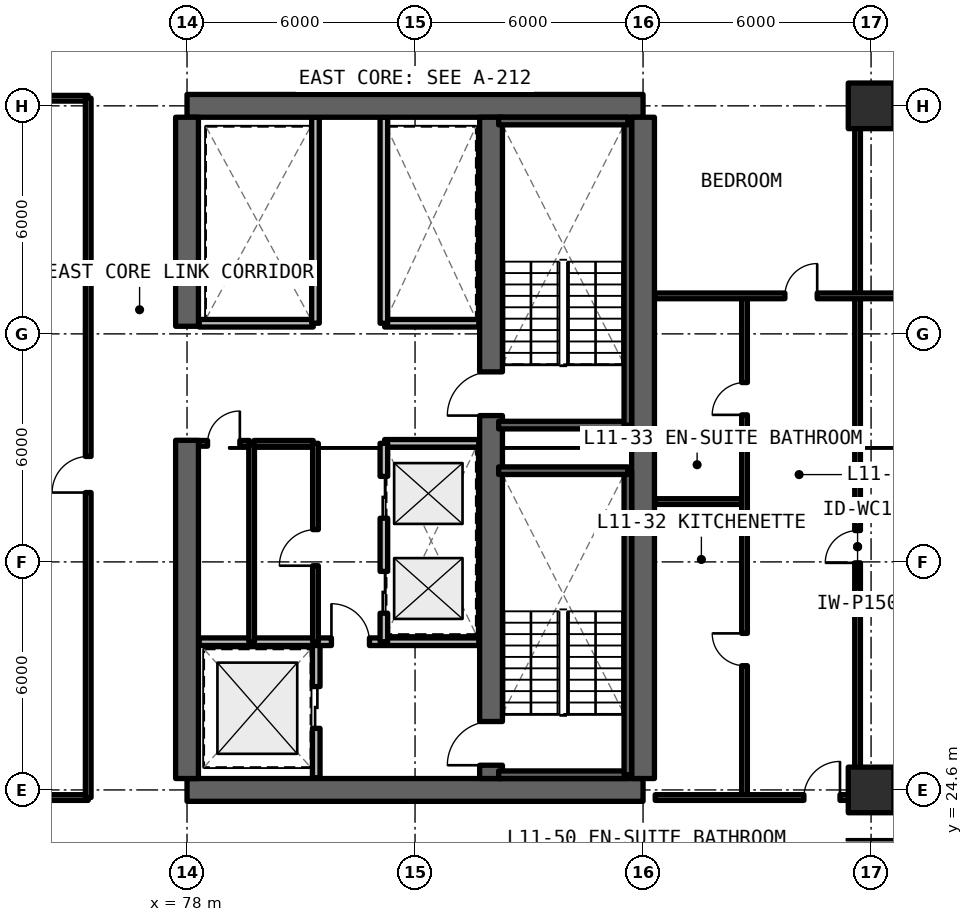
"""IFC4 building model, lengths in metres.
Left out: names, types, materials, properties, quantities, classifications, styles, units other than length and angle.
Written with IfcOpenShell. Run it as: python <this file> out.ifc"""

import sys

from ifc_helpers import new_model, si_unit, direction, frame, frame_2d, origin, origin_2d, place, context, subcontext, project, spatial, rectangle, extrude, element, fill, save


model = new_model("IFC4")
c1 = context("Model", 3, precision=1e-05, world=origin(), true_north=direction((0.0, 1.0)))
c2 = subcontext(c1, "Body", "Model", "MODEL_VIEW")
j1 = project(units=[si_unit("LENGTHUNIT", "METRE"), si_unit("PLANEANGLEUNIT", "RADIAN")], contexts=[c1])
p1 = place(None, origin())
s1 = spatial("IfcSite", under=j1, at=p1, CompositionType="ELEMENT")
p2 = place(p1, origin())
s2 = spatial("IfcBuilding", under=s1, at=p2, CompositionType="ELEMENT")
p3 = place(p2, frame((0.0, 0.0, 42.24)))
s3 = spatial("IfcBuildingStorey", under=s2, at=p3, CompositionType="ELEMENT", Elevation=42.24)
for number, where, z_axis, x_axis in (
    (1, (78.0, 24.6, 0.0), (0.0, 0.0, 1.0), (1.0, 0.0, 0.0)),
    (2, (90.0, 42.6, 0.0), (0.0, 0.0, 1.0), (-1.0, 0.0, 0.0)),
):
    element("IfcWall", number, at=place(p3, frame(where, z_axis=z_axis, x_axis=x_axis)), inside=s3, PredefinedType="SHEAR", context=c2, shape_type="SweptSolid", body=[
        extrude(rectangle(XDim=12.0, YDim=0.6, at=frame_2d((6.0, 0.0))), origin(), (0.0, 0.0, 1.0), 3.3),
    ])
p4 = place(p3, frame((90.0, 24.9, 0.0), z_axis=(0.0, 0.0, 1.0), x_axis=(0.0, 1.0, 0.0)))
e3 = element("IfcWall", 3, at=p4, inside=s3, PredefinedType="SHEAR", context=c2, shape_type="SweptSolid", body=[
    extrude(rectangle(XDim=17.4, YDim=0.6, at=frame_2d((8.7, 0.0))), origin(), (0.0, 0.0, 1.0), 3.3),
])
p5 = place(p3, frame((78.0, 24.9, 0.0), z_axis=(0.0, 0.0, 1.0), x_axis=(0.0, 1.0, 0.0)))
e4 = element("IfcWall", 4, at=p5, inside=s3, PredefinedType="SHEAR", context=c2, shape_type="SweptSolid", body=[
    extrude(rectangle(XDim=8.9, YDim=0.6, at=frame_2d((4.45, 0.0))), origin(), (0.0, 0.0, 1.0), 3.3),
])
p6 = place(p3, frame((78.0, 36.8, 0.0), z_axis=(0.0, 0.0, 1.0), x_axis=(0.0, 1.0, 0.0)))
e5 = element("IfcWall", 5, at=p6, inside=s3, PredefinedType="SHEAR", context=c2, shape_type="SweptSolid", body=[
    extrude(rectangle(XDim=5.5, YDim=0.6, at=frame_2d((2.75, 0.0))), origin(), (0.0, 0.0, 1.0), 3.3),
])
p7 = place(p3, frame((86.0, 24.9, 0.0), z_axis=(0.0, 0.0, 1.0), x_axis=(0.0, 1.0, 0.0)))
e6 = element("IfcWall", 6, at=p7, inside=s3, PredefinedType="SHEAR", context=c2, shape_type="SweptSolid", body=[
    extrude(rectangle(XDim=17.4, YDim=0.6, at=frame_2d((8.7, 0.0))), origin(), (0.0, 0.0, 1.0), 3.3),
])
p8 = place(p7, frame((0.35, 0.0, 0.0)))
e7 = element("IfcOpeningElement", 7, at=p8, cuts=e6, PredefinedType="OPENING", context=c2, shape_type="SweptSolid", body=[
    extrude(rectangle(XDim=1.15, YDim=2.15, at=frame_2d((0.575, 1.075))), frame((0.0, 0.31, 0.0), z_axis=(0.0, -1.0, 0.0), x_axis=(1.0, 0.0, 0.0)), (0.0, 0.0, 1.0), 0.62),
])
p9 = place(p7, frame((9.55, 0.0, 0.0)))
e8 = element("IfcOpeningElement", 8, at=p9, cuts=e6, PredefinedType="OPENING", context=c2, shape_type="SweptSolid", body=[
    extrude(rectangle(XDim=1.15, YDim=2.15, at=frame_2d((0.575, 1.075))), frame((0.0, 0.31, 0.0), z_axis=(0.0, -1.0, 0.0), x_axis=(1.0, 0.0, 0.0)), (0.0, 0.0, 1.0), 0.62),
])
for number, where, z_axis, x_axis in (
    (9, (96.0, 24.6, 0.0), (0.0, 0.0, 1.0), (1.0, 0.0, 0.0)),
    (10, (96.0, 42.6, 0.0), (0.0, 0.0, 1.0), (1.0, 0.0, 0.0)),
):
    element("IfcColumn", number, at=place(p3, frame(where, z_axis=z_axis, x_axis=x_axis)), inside=s3, PredefinedType="COLUMN", context=c2, shape_type="SweptSolid", body=[
        extrude(rectangle(XDim=1.2, YDim=1.2, at=origin_2d()), origin(), (0.0, 0.0, 1.0), 3.3),
    ])
p10 = place(p3, frame((81.4, 24.92, 0.0), z_axis=(0.0, 0.0, 1.0), x_axis=(0.0, 1.0, 0.0)))
e11 = element("IfcWall", 11, at=p10, inside=s3, PredefinedType="SOLIDWALL", context=c2, shape_type="SweptSolid", body=[
    extrude(rectangle(XDim=3.58, YDim=0.2, at=frame_2d((1.79, 0.0))), origin(), (0.0, 0.0, 1.0), 2.35),
])
p11 = place(p10, frame((1.3, 0.0, 0.0)))
e12 = element("IfcOpeningElement", 12, at=p11, cuts=e11, PredefinedType="OPENING", context=c2, shape_type="SweptSolid", body=[
    extrude(rectangle(XDim=1.1, YDim=2.2, at=frame_2d((0.55, 1.1))), frame((0.0, 0.11, 0.0), z_axis=(0.0, -1.0, 0.0), x_axis=(1.0, 0.0, 0.0)), (0.0, 0.0, 1.0), 0.22),
])
p12 = place(p3, frame((78.32, 28.5, 0.0), z_axis=(0.0, 0.0, 1.0), x_axis=(1.0, 0.0, 0.0)))
e13 = element("IfcWall", 13, at=p12, inside=s3, PredefinedType="SOLIDWALL", context=c2, shape_type="SweptSolid", body=[
    extrude(rectangle(XDim=7.36, YDim=0.2, at=frame_2d((3.68, 0.0))), origin(), (0.0, 0.0, 1.0), 2.35),
])
p13 = place(p12, frame((3.48, 0.0, 0.0)))
e14 = element("IfcOpeningElement", 14, at=p13, cuts=e13, PredefinedType="OPENING", context=c2, shape_type="SweptSolid", body=[
    extrude(rectangle(XDim=1.0, YDim=2.15, at=frame_2d((0.5, 1.075))), frame((0.0, 0.11, 0.0), z_axis=(0.0, -1.0, 0.0), x_axis=(1.0, 0.0, 0.0)), (0.0, 0.0, 1.0), 0.22),
])
p14 = place(p3, frame((83.2, 33.72, 0.0), z_axis=(0.0, 0.0, 1.0), x_axis=(1.0, 0.0, 0.0)))
e15 = element("IfcWall", 15, at=p14, inside=s3, PredefinedType="SOLIDWALL", context=c2, shape_type="SweptSolid", body=[
    extrude(rectangle(XDim=2.48, YDim=0.2, at=frame_2d((1.24, 0.0))), origin(), (0.0, 0.0, 1.0), 2.35),
])
p15 = place(p3, frame((83.18, 28.5, 0.0), z_axis=(0.0, 0.0, 1.0), x_axis=(0.0, 1.0, 0.0)))
e16 = element("IfcWall", 16, at=p15, inside=s3, PredefinedType="SOLIDWALL", context=c2, shape_type="SweptSolid", body=[
    extrude(rectangle(XDim=5.22, YDim=0.2, at=frame_2d((2.61, 0.0))), origin(), (0.0, 0.0, 1.0), 2.35),
])
p16 = place(p15, frame((0.75, 0.0, 0.0)))
e17 = element("IfcOpeningElement", 17, at=p16, cuts=e16, PredefinedType="OPENING", context=c2, shape_type="SweptSolid", body=[
    extrude(rectangle(XDim=1.1, YDim=2.2, at=frame_2d((0.55, 1.1))), frame((0.0, 0.11, 0.0), z_axis=(0.0, -1.0, 0.0), x_axis=(1.0, 0.0, 0.0)), (0.0, 0.0, 1.0), 0.22),
])
p17 = place(p15, frame((3.25, 0.0, 0.0)))
e18 = element("IfcOpeningElement", 18, at=p17, cuts=e16, PredefinedType="OPENING", context=c2, shape_type="SweptSolid", body=[
    extrude(rectangle(XDim=1.1, YDim=2.2, at=frame_2d((0.55, 1.1))), frame((0.0, 0.11, 0.0), z_axis=(0.0, -1.0, 0.0), x_axis=(1.0, 0.0, 0.0)), (0.0, 0.0, 1.0), 0.22),
])
p18 = place(p3, frame((79.7, 28.5, 0.0), z_axis=(0.0, 0.0, 1.0), x_axis=(0.0, 1.0, 0.0)))
e19 = element("IfcWall", 19, at=p18, inside=s3, PredefinedType="SOLIDWALL", context=c2, shape_type="SweptSolid", body=[
    extrude(rectangle(XDim=5.22, YDim=0.15, at=frame_2d((2.61, 0.0))), origin(), (0.0, 0.0, 1.0), 2.35),
])
p19 = place(p3, frame((79.76, 33.72, 0.0), z_axis=(0.0, 0.0, 1.0), x_axis=(1.0, 0.0, 0.0)))
e20 = element("IfcWall", 20, at=p19, inside=s3, PredefinedType="SOLIDWALL", context=c2, shape_type="SweptSolid", body=[
    extrude(rectangle(XDim=1.56, YDim=0.15, at=frame_2d((0.78, 0.0))), origin(), (0.0, 0.0, 1.0), 2.35),
])
p20 = place(p3, frame((78.32, 33.72, 0.0), z_axis=(0.0, 0.0, 1.0), x_axis=(1.0, 0.0, 0.0)))
e21 = element("IfcWall", 21, at=p20, inside=s3, PredefinedType="SOLIDWALL", context=c2, shape_type="SweptSolid", body=[
    extrude(rectangle(XDim=1.32, YDim=0.15, at=frame_2d((0.66, 0.0))), origin(), (0.0, 0.0, 1.0), 2.35),
])
p21 = place(p20, frame((0.22, 0.0, 0.0)))
e22 = element("IfcOpeningElement", 22, at=p21, cuts=e21, PredefinedType="OPENING", context=c2, shape_type="SweptSolid", body=[
    extrude(rectangle(XDim=0.85, YDim=2.1, at=frame_2d((0.425, 1.05))), frame((0.0, 0.085, 0.0), z_axis=(0.0, -1.0, 0.0), x_axis=(1.0, 0.0, 0.0)), (0.0, 0.0, 1.0), 0.17),
])
p22 = place(p3, frame((81.38, 28.5, 0.0), z_axis=(0.0, 0.0, 1.0), x_axis=(0.0, 1.0, 0.0)))
e23 = element("IfcWall", 23, at=p22, inside=s3, PredefinedType="SOLIDWALL", context=c2, shape_type="SweptSolid", body=[
    extrude(rectangle(XDim=5.22, YDim=0.15, at=frame_2d((2.61, 0.0))), origin(), (0.0, 0.0, 1.0), 2.35),
])
p23 = place(p22, frame((2.0, 0.0, 0.0)))
e24 = element("IfcOpeningElement", 24, at=p23, cuts=e23, PredefinedType="OPENING", context=c2, shape_type="SweptSolid", body=[
    extrude(rectangle(XDim=0.95, YDim=2.15, at=frame_2d((0.475, 1.075))), frame((0.0, 0.085, 0.0), z_axis=(0.0, -1.0, 0.0), x_axis=(1.0, 0.0, 0.0)), (0.0, 0.0, 1.0), 0.17),
])
p24 = place(p3, frame((83.2, 36.88, 0.0), z_axis=(0.0, 0.0, 1.0), x_axis=(1.0, 0.0, 0.0)))
e25 = element("IfcWall", 25, at=p24, inside=s3, PredefinedType="SOLIDWALL", context=c2, shape_type="SweptSolid", body=[
    extrude(rectangle(XDim=2.48, YDim=0.2, at=frame_2d((1.24, 0.0))), origin(), (0.0, 0.0, 1.0), 2.35),
])
p25 = place(p3, frame((83.18, 36.88, 0.0), z_axis=(0.0, 0.0, 1.0), x_axis=(0.0, 1.0, 0.0)))
e26 = element("IfcWall", 26, at=p25, inside=s3, PredefinedType="SOLIDWALL", context=c2, shape_type="SweptSolid", body=[
    extrude(rectangle(XDim=5.42, YDim=0.2, at=frame_2d((2.71, 0.0))), origin(), (0.0, 0.0, 1.0), 2.35),
])
p26 = place(p3, frame((78.32, 36.88, 0.0), z_axis=(0.0, 0.0, 1.0), x_axis=(1.0, 0.0, 0.0)))
e27 = element("IfcWall", 27, at=p26, inside=s3, PredefinedType="SOLIDWALL", context=c2, shape_type="SweptSolid", body=[
    extrude(rectangle(XDim=3.0, YDim=0.2, at=frame_2d((1.5, 0.0))), origin(), (0.0, 0.0, 1.0), 2.35),
])
p27 = place(p3, frame((81.38, 36.88, 0.0), z_axis=(0.0, 0.0, 1.0), x_axis=(0.0, 1.0, 0.0)))
e28 = element("IfcWall", 28, at=p27, inside=s3, PredefinedType="SOLIDWALL", context=c2, shape_type="SweptSolid", body=[
    extrude(rectangle(XDim=5.42, YDim=0.2, at=frame_2d((2.71, 0.0))), origin(), (0.0, 0.0, 1.0), 2.35),
])
for number, where, z_axis, x_axis in (
    (29, (67.15, 24.4, 0.0), (0.0, 0.0, 1.0), (1.0, 0.0, 0.0)),
    (30, (67.15, 42.8, 0.0), (0.0, 0.0, 1.0), (1.0, 0.0, 0.0)),
):
    element("IfcWall", number, at=place(p3, frame(where, z_axis=z_axis, x_axis=x_axis)), inside=s3, PredefinedType="SOLIDWALL", context=c2, shape_type="SweptSolid", body=[
        extrude(rectangle(XDim=8.25, YDim=0.15, at=frame_2d((4.125, 0.0))), origin(), (0.0, 0.0, 1.0), 2.295),
    ])
p28 = place(p3, frame((75.4, 24.4, 0.0), z_axis=(0.0, 0.0, 1.0), x_axis=(0.0, 1.0, 0.0)))
e31 = element("IfcWall", 31, at=p28, inside=s3, PredefinedType="SOLIDWALL", context=c2, shape_type="SweptSolid", body=[
    extrude(rectangle(XDim=18.4, YDim=0.15, at=frame_2d((9.2, 0.0))), origin(), (0.0, 0.0, 1.0), 2.35),
])
p29 = place(p28, frame((8.025, 0.0, 0.0)))
e32 = element("IfcOpeningElement", 32, at=p29, cuts=e31, PredefinedType="OPENING", context=c2, shape_type="SweptSolid", body=[
    extrude(rectangle(XDim=0.95, YDim=2.15, at=frame_2d((0.475, 1.075))), frame((0.0, 0.085, 0.0), z_axis=(0.0, -1.0, 0.0), x_axis=(1.0, 0.0, 0.0)), (0.0, 0.0, 1.0), 0.17),
])
p30 = place(p3, frame((95.645, 24.4, 0.0), z_axis=(0.0, 0.0, 1.0), x_axis=(0.0, 1.0, 0.0)))
e33 = element("IfcWall", 33, at=p30, inside=s3, PredefinedType="PARTITIONING", context=c2, shape_type="SweptSolid", body=[
    extrude(rectangle(XDim=13.2, YDim=0.15, at=frame_2d((6.6, 0.0))), origin(), (0.0, 0.0, 1.0), 2.35),
])
p31 = place(p30, frame((6.175, 0.0, 0.0)))
e34 = element("IfcOpeningElement", 34, at=p31, cuts=e33, PredefinedType="OPENING", context=c2, shape_type="SweptSolid", body=[
    extrude(rectangle(XDim=0.85, YDim=2.1, at=frame_2d((0.425, 1.05))), frame((0.0, 0.085, 0.0), z_axis=(0.0, -1.0, 0.0), x_axis=(1.0, 0.0, 0.0)), (0.0, 0.0, 1.0), 0.17),
])
p32 = place(p3, frame((90.32, 32.188, 0.0), z_axis=(0.0, 0.0, 1.0), x_axis=(1.0, 0.0, 0.0)))
e35 = element("IfcWall", 35, at=p32, inside=s3, PredefinedType="PARTITIONING", context=c2, shape_type="SweptSolid", body=[
    extrude(rectangle(XDim=2.35, YDim=0.15, at=frame_2d((1.175, 0.0))), origin(), (0.0, 0.0, 1.0), 2.35),
])
p33 = place(p3, frame((92.67, 24.4, 0.0), z_axis=(0.0, 0.0, 1.0), x_axis=(0.0, 1.0, 0.0)))
e36 = element("IfcWall", 36, at=p33, inside=s3, PredefinedType="PARTITIONING", context=c2, shape_type="SweptSolid", body=[
    extrude(rectangle(XDim=13.2, YDim=0.15, at=frame_2d((6.6, 0.0))), origin(), (0.0, 0.0, 1.0), 2.35),
])
p34 = place(p33, frame((3.469, 0.0, 0.0)))
e37 = element("IfcOpeningElement", 37, at=p34, cuts=e36, PredefinedType="OPENING", context=c2, shape_type="SweptSolid", body=[
    extrude(rectangle(XDim=0.85, YDim=2.1, at=frame_2d((0.425, 1.05))), frame((0.0, 0.085, 0.0), z_axis=(0.0, -1.0, 0.0), x_axis=(1.0, 0.0, 0.0)), (0.0, 0.0, 1.0), 0.17),
])
p35 = place(p33, frame((10.069, 0.0, 0.0)))
e38 = element("IfcOpeningElement", 38, at=p35, cuts=e36, PredefinedType="OPENING", context=c2, shape_type="SweptSolid", body=[
    extrude(rectangle(XDim=0.85, YDim=2.1, at=frame_2d((0.425, 1.05))), frame((0.0, 0.085, 0.0), z_axis=(0.0, -1.0, 0.0), x_axis=(1.0, 0.0, 0.0)), (0.0, 0.0, 1.0), 0.17),
])
p36 = place(p3, frame((95.645, 37.6, 0.0), z_axis=(0.0, 0.0, 1.0), x_axis=(0.0, 1.0, 0.0)))
e39 = element("IfcWall", 39, at=p36, inside=s3, PredefinedType="PARTITIONING", context=c2, shape_type="SweptSolid", body=[
    extrude(rectangle(XDim=5.2, YDim=0.15, at=frame_2d((2.6, 0.0))), origin(), (0.0, 0.0, 1.0), 2.35),
])
p37 = place(p3, frame((90.32, 37.6, 0.0), z_axis=(0.0, 0.0, 1.0), x_axis=(1.0, 0.0, 0.0)))
e40 = element("IfcWall", 40, at=p37, inside=s3, PredefinedType="PARTITIONING", context=c2, shape_type="SweptSolid", body=[
    extrude(rectangle(XDim=10.24, YDim=0.15, at=frame_2d((5.12, 0.0))), origin(), (0.0, 0.0, 1.0), 2.35),
])
p38 = place(p37, frame((3.412, 0.0, 0.0)))
e41 = element("IfcOpeningElement", 41, at=p38, cuts=e40, PredefinedType="OPENING", context=c2, shape_type="SweptSolid", body=[
    extrude(rectangle(XDim=0.85, YDim=2.1, at=frame_2d((0.425, 1.05))), frame((0.0, 0.085, 0.0), z_axis=(0.0, -1.0, 0.0), x_axis=(1.0, 0.0, 0.0)), (0.0, 0.0, 1.0), 0.17),
])
p39 = place(p37, frame((7.357, 0.0, 0.0)))
e42 = element("IfcOpeningElement", 42, at=p39, cuts=e40, PredefinedType="OPENING", context=c2, shape_type="SweptSolid", body=[
    extrude(rectangle(XDim=0.85, YDim=2.1, at=frame_2d((0.425, 1.05))), frame((0.0, 0.085, 0.0), z_axis=(0.0, -1.0, 0.0), x_axis=(1.0, 0.0, 0.0)), (0.0, 0.0, 1.0), 0.17),
])
p40 = place(p3, frame((90.32, 24.4, 0.0), z_axis=(0.0, 0.0, 1.0), x_axis=(1.0, 0.0, 0.0)))
e43 = element("IfcWall", 43, at=p40, inside=s3, PredefinedType="SOLIDWALL", context=c2, shape_type="SweptSolid", body=[
    extrude(rectangle(XDim=10.24, YDim=0.15, at=frame_2d((5.12, 0.0))), origin(), (0.0, 0.0, 1.0), 2.295),
])
p41 = place(p40, frame((3.913, 0.0, 0.0)))
e44 = element("IfcOpeningElement", 44, at=p41, cuts=e43, PredefinedType="OPENING", context=c2, shape_type="SweptSolid", body=[
    extrude(rectangle(XDim=0.95, YDim=2.15, at=frame_2d((0.475, 1.075))), frame((0.0, 0.085, 0.0), z_axis=(0.0, -1.0, 0.0), x_axis=(1.0, 0.0, 0.0)), (0.0, 0.0, 1.0), 0.17),
])
p42 = place(p3, frame((86.2, 25.0, 0.0), z_axis=(0.0, 0.0, 1.0), x_axis=(1.0, 0.0, 0.0)))
e45 = element("IfcWall", 45, at=p42, inside=s3, PredefinedType="SOLIDWALL", context=c2, shape_type="SweptSolid", body=[
    extrude(rectangle(XDim=3.4, YDim=0.2, at=frame_2d((1.7, 0.0))), origin(), (0.0, 0.0, 1.0), 3.3),
])
p43 = place(p3, frame((89.6, 25.0, 0.0), z_axis=(0.0, 0.0, 1.0), x_axis=(0.0, 1.0, 0.0)))
e46 = element("IfcWall", 46, at=p43, inside=s3, PredefinedType="SOLIDWALL", context=c2, shape_type="SweptSolid", body=[
    extrude(rectangle(XDim=8.0, YDim=0.2, at=frame_2d((4.0, 0.0))), origin(), (0.0, 0.0, 1.0), 3.3),
])
for number, where, z_axis, x_axis in (
    (47, (89.6, 33.0, 0.0), (0.0, 0.0, 1.0), (-1.0, 0.0, 0.0)),
    (48, (86.2, 34.2, 0.0), (0.0, 0.0, 1.0), (1.0, 0.0, 0.0)),
):
    element("IfcWall", number, at=place(p3, frame(where, z_axis=z_axis, x_axis=x_axis)), inside=s3, PredefinedType="SOLIDWALL", context=c2, shape_type="SweptSolid", body=[
        extrude(rectangle(XDim=3.4, YDim=0.2, at=frame_2d((1.7, 0.0))), origin(), (0.0, 0.0, 1.0), 3.3),
    ])
p44 = place(p3, frame((89.6, 34.2, 0.0), z_axis=(0.0, 0.0, 1.0), x_axis=(0.0, 1.0, 0.0)))
e49 = element("IfcWall", 49, at=p44, inside=s3, PredefinedType="SOLIDWALL", context=c2, shape_type="SweptSolid", body=[
    extrude(rectangle(XDim=8.0, YDim=0.2, at=frame_2d((4.0, 0.0))), origin(), (0.0, 0.0, 1.0), 3.3),
])
p45 = place(p3, frame((89.6, 42.2, 0.0), z_axis=(0.0, 0.0, 1.0), x_axis=(-1.0, 0.0, 0.0)))
e50 = element("IfcWall", 50, at=p45, inside=s3, PredefinedType="SOLIDWALL", context=c2, shape_type="SweptSolid", body=[
    extrude(rectangle(XDim=3.4, YDim=0.2, at=frame_2d((1.7, 0.0))), origin(), (0.0, 0.0, 1.0), 3.3),
])
p46 = place(p11, origin())
e51 = element("IfcDoor", 51, at=p46, inside=s3, OperationType="SLIDING_TO_LEFT", PredefinedType="DOOR", context=c2, shape_type="SweptSolid", body=[
    extrude(rectangle(XDim=1.1, YDim=2.2, at=frame_2d((0.55, 1.1))), frame((0.0, 0.025, 0.0), z_axis=(0.0, -1.0, 0.0), x_axis=(1.0, 0.0, 0.0)), (0.0, 0.0, 1.0), 0.05),
])
fill(e12, e51)
p47 = place(p13, origin())
e52 = element("IfcDoor", 52, at=p47, inside=s3, OperationType="SINGLE_SWING_LEFT", PredefinedType="DOOR", context=c2, shape_type="SweptSolid", body=[
    extrude(rectangle(XDim=1.0, YDim=2.15, at=frame_2d((0.5, 1.075))), frame((0.0, 0.025, 0.0), z_axis=(0.0, -1.0, 0.0), x_axis=(1.0, 0.0, 0.0)), (0.0, 0.0, 1.0), 0.05),
])
fill(e14, e52)
p48 = place(p16, origin())
e53 = element("IfcDoor", 53, at=p48, inside=s3, OperationType="SLIDING_TO_LEFT", PredefinedType="DOOR", context=c2, shape_type="SweptSolid", body=[
    extrude(rectangle(XDim=1.1, YDim=2.2, at=frame_2d((0.55, 1.1))), frame((0.0, 0.025, 0.0), z_axis=(0.0, -1.0, 0.0), x_axis=(1.0, 0.0, 0.0)), (0.0, 0.0, 1.0), 0.05),
])
fill(e17, e53)
p49 = place(p17, origin())
e54 = element("IfcDoor", 54, at=p49, inside=s3, OperationType="SLIDING_TO_RIGHT", PredefinedType="DOOR", context=c2, shape_type="SweptSolid", body=[
    extrude(rectangle(XDim=1.1, YDim=2.2, at=frame_2d((0.55, 1.1))), frame((0.0, 0.025, 0.0), z_axis=(0.0, -1.0, 0.0), x_axis=(1.0, 0.0, 0.0)), (0.0, 0.0, 1.0), 0.05),
])
fill(e18, e54)
p50 = place(p21, origin())
e55 = element("IfcDoor", 55, at=p50, inside=s3, OperationType="SINGLE_SWING_RIGHT", PredefinedType="DOOR", context=c2, shape_type="SweptSolid", body=[
    extrude(rectangle(XDim=0.85, YDim=2.1, at=frame_2d((0.425, 1.05))), frame((0.0, 0.025, 0.0), z_axis=(0.0, -1.0, 0.0), x_axis=(1.0, 0.0, 0.0)), (0.0, 0.0, 1.0), 0.05),
])
fill(e22, e55)
p51 = place(p23, origin())
e56 = element("IfcDoor", 56, at=p51, inside=s3, OperationType="SINGLE_SWING_LEFT", PredefinedType="DOOR", context=c2, shape_type="SweptSolid", body=[
    extrude(rectangle(XDim=0.95, YDim=2.15, at=frame_2d((0.475, 1.075))), frame((0.0, 0.025, 0.0), z_axis=(0.0, -1.0, 0.0), x_axis=(1.0, 0.0, 0.0)), (0.0, 0.0, 1.0), 0.05),
])
fill(e24, e56)
p52 = place(p29, origin())
e57 = element("IfcDoor", 57, at=p52, inside=s3, OperationType="SINGLE_SWING_LEFT", PredefinedType="DOOR", context=c2, shape_type="SweptSolid", body=[
    extrude(rectangle(XDim=0.95, YDim=2.15, at=frame_2d((0.475, 1.075))), frame((0.0, 0.025, 0.0), z_axis=(0.0, -1.0, 0.0), x_axis=(1.0, 0.0, 0.0)), (0.0, 0.0, 1.0), 0.05),
])
fill(e32, e57)
p53 = place(p31, origin())
e58 = element("IfcDoor", 58, at=p53, inside=s3, OperationType="SINGLE_SWING_LEFT", PredefinedType="DOOR", context=c2, shape_type="SweptSolid", body=[
    extrude(rectangle(XDim=0.85, YDim=2.1, at=frame_2d((0.425, 1.05))), frame((0.0, 0.025, 0.0), z_axis=(0.0, -1.0, 0.0), x_axis=(1.0, 0.0, 0.0)), (0.0, 0.0, 1.0), 0.05),
])
fill(e34, e58)
p54 = place(p34, origin())
e59 = element("IfcDoor", 59, at=p54, inside=s3, OperationType="SINGLE_SWING_RIGHT", PredefinedType="DOOR", context=c2, shape_type="SweptSolid", body=[
    extrude(rectangle(XDim=0.85, YDim=2.1, at=frame_2d((0.425, 1.05))), frame((0.0, 0.025, 0.0), z_axis=(0.0, -1.0, 0.0), x_axis=(1.0, 0.0, 0.0)), (0.0, 0.0, 1.0), 0.05),
])
fill(e37, e59)
p55 = place(p35, origin())
e60 = element("IfcDoor", 60, at=p55, inside=s3, OperationType="SINGLE_SWING_LEFT", PredefinedType="DOOR", context=c2, shape_type="SweptSolid", body=[
    extrude(rectangle(XDim=0.85, YDim=2.1, at=frame_2d((0.425, 1.05))), frame((0.0, 0.025, 0.0), z_axis=(0.0, -1.0, 0.0), x_axis=(1.0, 0.0, 0.0)), (0.0, 0.0, 1.0), 0.05),
])
fill(e38, e60)
p56 = place(p38, origin())
e61 = element("IfcDoor", 61, at=p56, inside=s3, OperationType="SINGLE_SWING_RIGHT", PredefinedType="DOOR", context=c2, shape_type="SweptSolid", body=[
    extrude(rectangle(XDim=0.85, YDim=2.1, at=frame_2d((0.425, 1.05))), frame((0.0, 0.025, 0.0), z_axis=(0.0, -1.0, 0.0), x_axis=(1.0, 0.0, 0.0)), (0.0, 0.0, 1.0), 0.05),
])
fill(e41, e61)
p57 = place(p41, origin())
e62 = element("IfcDoor", 62, at=p57, inside=s3, OperationType="SINGLE_SWING_RIGHT", PredefinedType="DOOR", context=c2, shape_type="SweptSolid", body=[
    extrude(rectangle(XDim=0.95, YDim=2.15, at=frame_2d((0.475, 1.075))), frame((0.0, 0.025, 0.0), z_axis=(0.0, -1.0, 0.0), x_axis=(1.0, 0.0, 0.0)), (0.0, 0.0, 1.0), 0.05),
])
fill(e44, e62)
p58 = place(p8, origin())
e63 = element("IfcDoor", 63, at=p58, inside=s3, OperationType="SINGLE_SWING_RIGHT", PredefinedType="DOOR", context=c2, shape_type="SweptSolid", body=[
    extrude(rectangle(XDim=1.15, YDim=2.15, at=frame_2d((0.575, 1.075))), frame((0.0, 0.025, 0.0), z_axis=(0.0, -1.0, 0.0), x_axis=(1.0, 0.0, 0.0)), (0.0, 0.0, 1.0), 0.05),
])
fill(e7, e63)
p59 = place(p9, origin())
e64 = element("IfcDoor", 64, at=p59, inside=s3, OperationType="SINGLE_SWING_LEFT", PredefinedType="DOOR", context=c2, shape_type="SweptSolid", body=[
    extrude(rectangle(XDim=1.15, YDim=2.15, at=frame_2d((0.575, 1.075))), frame((0.0, 0.025, 0.0), z_axis=(0.0, -1.0, 0.0), x_axis=(1.0, 0.0, 0.0)), (0.0, 0.0, 1.0), 0.05),
])
fill(e8, e64)
save(model, sys.argv[1])
